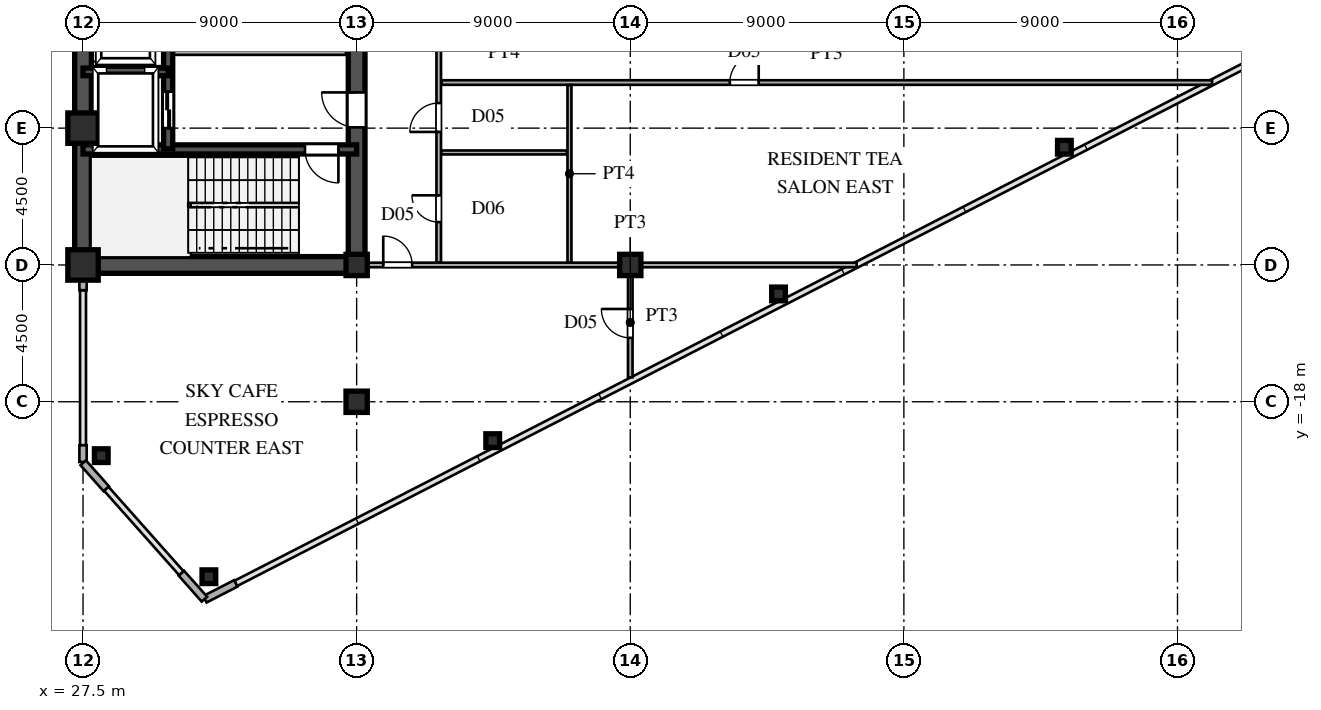
"""IFC4 building model, lengths in metres.
Left out: names, types, materials, properties, quantities, classifications, styles, units other than length and angle.
Written with IfcOpenShell. Run it as: python <this file> out.ifc"""

import sys

from ifc_helpers import new_model, si_unit, direction, frame, frame_2d, origin, origin_2d, place, context, subcontext, project, spatial, rectangle, hollow_rectangle, i_section, extrude, source, transform, mapped, element, fill, save


model = new_model("IFC4")
c1 = context("Model", 3, precision=1e-05, world=origin(), true_north=direction((0.0, 1.0)))
c2 = subcontext(c1, "Body", "Model", "MODEL_VIEW")
j1 = project(units=[si_unit("LENGTHUNIT", "METRE"), si_unit("PLANEANGLEUNIT", "RADIAN")], contexts=[c1])
p1 = place(None, origin())
s1 = spatial("IfcSite", under=j1, at=p1, CompositionType="ELEMENT")
p2 = place(p1, origin())
s2 = spatial("IfcBuilding", under=s1, at=p2, CompositionType="ELEMENT")
p3 = place(p2, frame((0.0, 0.0, 135.6)))
s3 = spatial("IfcBuildingStorey", under=s2, at=p3, CompositionType="ELEMENT", Elevation=135.6)
m1 = source(origin(), c2, "Body", "SweptSolid", [
    extrude(hollow_rectangle(XDim=1.0, YDim=1.0, WallThickness=0.042, at=origin_2d()), origin(), (0.0, 0.0, 1.0), 4.8),
])
for number, where, z_axis, x_axis in (
    (1, (27.5, -13.5, 0.0), (0.0, 0.0, 1.0), (1.0, 0.0, 0.0)),
    (2, (27.5, -9.0, 0.0), (0.0, 0.0, 1.0), (1.0, 0.0, 0.0)),
):
    element("IfcColumn", number, at=place(p3, frame(where, z_axis=z_axis, x_axis=x_axis)), inside=s3, PredefinedType="COLUMN", context=c2, shape_type="MappedRepresentation", body=[
        mapped(m1, transform((0.0, 0.0, 0.0), scale=1.0)),
    ])
m2 = source(origin(), c2, "Body", "SweptSolid", [
    extrude(i_section(OverallWidth=0.7, OverallDepth=0.7, WebThickness=0.028, FlangeThickness=0.045, at=origin_2d()), origin(), (0.0, 0.0, 1.0), 4.8),
])
for number, where, z_axis, x_axis in (
    (3, (36.5, -18.0, 0.0), (0.0, 0.0, 1.0), (1.0, 0.0, 0.0)),
    (4, (36.5, -13.5, 0.0), (0.0, 0.0, 1.0), (1.0, 0.0, 0.0)),
    (5, (45.5, -13.5, 0.0), (0.0, 0.0, 1.0), (1.0, 0.0, 0.0)),
):
    element("IfcColumn", number, at=place(p3, frame(where, z_axis=z_axis, x_axis=x_axis)), inside=s3, PredefinedType="COLUMN", context=c2, shape_type="MappedRepresentation", body=[
        mapped(m2, transform((0.0, 0.0, 0.0), scale=1.0)),
    ])
m3 = source(origin(), c2, "Body", "SweptSolid", [
    extrude(hollow_rectangle(XDim=0.45, YDim=0.45, WallThickness=0.018, at=origin_2d()), origin(), (0.0, 0.0, 1.0), 4.8),
])
for number, where, z_axis, x_axis in (
    (6, (31.64, -23.754, 0.0), (0.0, 0.0, 1.0), (1.0, 0.0, 0.0)),
    (7, (28.1, -19.772, 0.0), (0.0, 0.0, 1.0), (1.0, 0.0, 0.0)),
    (8, (40.976, -19.278, 0.0), (0.0, 0.0, 1.0), (1.0, 0.0, 0.0)),
    (9, (50.377, -14.453, 0.0), (0.0, 0.0, 1.0), (1.0, 0.0, 0.0)),
    (10, (59.779, -9.629, 0.0), (0.0, 0.0, 1.0), (1.0, 0.0, 0.0)),
):
    element("IfcColumn", number, at=place(p3, frame(where, z_axis=z_axis, x_axis=x_axis)), inside=s3, PredefinedType="COLUMN", context=c2, shape_type="MappedRepresentation", body=[
        mapped(m3, transform((0.0, 0.0, 0.0), scale=1.0)),
    ])
p4 = place(p3, frame((31.509, -24.495, 0.0), z_axis=(0.0, 0.0, 1.0), x_axis=(0.889797395748, 0.456355776255, 0.0)))
e11 = element("IfcWall", 11, at=p4, inside=s3, PredefinedType="SOLIDWALL", context=c2, shape_type="SweptSolid", body=[
    extrude(rectangle(XDim=1.14, YDim=0.24, at=frame_2d((0.57, 0.0))), origin(), (0.0, 0.0, 1.0), 4.58),
])
p5 = place(p3, frame((27.5, -19.98, 0.0), z_axis=(0.0, 0.0, 1.0), x_axis=(0.0, 1.0, 0.0)))
e12 = element("IfcWall", 12, at=p5, inside=s3, PredefinedType="SOLIDWALL", context=c2, shape_type="SweptSolid", body=[
    extrude(rectangle(XDim=0.55, YDim=0.24, at=frame_2d((0.275, 0.0))), origin(), (0.0, 0.0, 1.0), 4.58),
])
p6 = place(p3, frame((27.5, -14.33, 0.0), z_axis=(0.0, 0.0, 1.0), x_axis=(0.0, 1.0, 0.0)))
e13 = element("IfcWall", 13, at=p6, inside=s3, PredefinedType="SOLIDWALL", context=c2, shape_type="SweptSolid", body=[
    extrude(rectangle(XDim=0.55, YDim=0.24, at=frame_2d((0.275, 0.0))), origin(), (0.0, 0.0, 1.0), 4.08),
])
for number, where, z_axis, x_axis in (
    (14, (27.507, -20.008, 0.0), (0.0, 0.0, 1.0), (0.664, -0.747, 0.0)),
    (15, (30.736, -23.64, 0.0), (0.0, 0.0, 1.0), (0.664, -0.747, 0.0)),
):
    element("IfcWall", number, at=place(p3, frame(where, z_axis=z_axis, x_axis=x_axis)), inside=s3, PredefinedType="SOLIDWALL", context=c2, shape_type="SweptSolid", body=[
        extrude(rectangle(XDim=1.14, YDim=0.24, at=frame_2d((0.57, 0.0))), origin(), (0.0, 0.0, 1.0), 4.58),
    ])
p7 = place(p3, frame((27.5, -13.5, 0.0), z_axis=(0.0, 0.0, 1.0), x_axis=(0.0, 1.0, 0.0)))
e16 = element("IfcWall", 16, at=p7, inside=s3, PredefinedType="SHEAR", context=c2, shape_type="SweptSolid", body=[
    extrude(rectangle(XDim=12.2, YDim=0.55, at=frame_2d((6.1, 0.0))), origin(), (0.0, 0.0, 1.0), 4.58),
])
p8 = place(p3, frame((27.5, -13.5, 0.0), z_axis=(0.0, 0.0, 1.0), x_axis=(1.0, 0.0, 0.0)))
e17 = element("IfcWall", 17, at=p8, inside=s3, PredefinedType="SHEAR", context=c2, shape_type="SweptSolid", body=[
    extrude(rectangle(XDim=9.0, YDim=0.55, at=frame_2d((4.5, 0.0))), origin(), (0.0, 0.0, 1.0), 4.58),
])
p9 = place(p3, frame((36.5, -13.65, 0.0), z_axis=(0.0, 0.0, 1.0), x_axis=(0.0, 1.0, 0.0)))
e18 = element("IfcWall", 18, at=p9, inside=s3, PredefinedType="SHEAR", context=c2, shape_type="SweptSolid", body=[
    extrude(rectangle(XDim=7.15, YDim=0.55, at=frame_2d((3.575, 0.0))), origin(), (0.0, 0.0, 1.0), 4.58),
])
p10 = place(p9, frame((4.675, 0.0, 0.0)))
e19 = element("IfcOpeningElement", 19, at=p10, cuts=e18, PredefinedType="OPENING", context=c2, shape_type="SweptSolid", body=[
    extrude(rectangle(XDim=1.15, YDim=2.2, at=frame_2d((0.575, 1.1))), frame((0.0, 0.285, 0.0), z_axis=(0.0, -1.0, 0.0), x_axis=(1.0, 0.0, 0.0)), (0.0, 0.0, 1.0), 0.57),
])
p11 = place(p3, frame((27.5, -9.7, 0.0), z_axis=(0.0, 0.0, 1.0), x_axis=(1.0, 0.0, 0.0)))
e20 = element("IfcWall", 20, at=p11, inside=s3, PredefinedType="SHEAR", context=c2, shape_type="SweptSolid", body=[
    extrude(rectangle(XDim=9.0, YDim=0.3, at=frame_2d((4.5, 0.0))), origin(), (0.0, 0.0, 1.0), 4.58),
])
p12 = place(p11, frame((7.3, 0.0, 0.0)))
e21 = element("IfcOpeningElement", 21, at=p12, cuts=e20, PredefinedType="OPENING", context=c2, shape_type="SweptSolid", body=[
    extrude(rectangle(XDim=1.1, YDim=2.2, at=frame_2d((0.55, 1.1))), frame((0.0, 0.16, 0.0), z_axis=(0.0, -1.0, 0.0), x_axis=(1.0, 0.0, 0.0)), (0.0, 0.0, 1.0), 0.32),
])
p13 = place(p3, frame((27.5, -7.15, 0.0), z_axis=(0.0, 0.0, 1.0), x_axis=(1.0, 0.0, 0.0)))
e22 = element("IfcWall", 22, at=p13, inside=s3, PredefinedType="SHEAR", context=c2, shape_type="SweptSolid", body=[
    extrude(rectangle(XDim=2.8, YDim=0.25, at=frame_2d((1.4, 0.0))), origin(), (0.0, 0.0, 1.0), 4.58),
])
p14 = place(p3, frame((30.3, -9.68, 0.0), z_axis=(0.0, 0.0, 1.0), x_axis=(0.0, 1.0, 0.0)))
e23 = element("IfcWall", 23, at=p14, inside=s3, PredefinedType="SHEAR", context=c2, shape_type="SweptSolid", body=[
    extrude(rectangle(XDim=2.56, YDim=0.3, at=frame_2d((1.28, 0.0))), origin(), (0.0, 0.0, 1.0), 4.58),
])
p15 = place(p14, frame((0.68, 0.0, 0.0)))
e24 = element("IfcOpeningElement", 24, at=p15, cuts=e23, PredefinedType="OPENING", context=c2, shape_type="SweptSolid", body=[
    extrude(rectangle(XDim=1.2, YDim=2.25, at=frame_2d((0.6, 1.125))), frame((0.0, 0.16, 0.0), z_axis=(0.0, -1.0, 0.0), x_axis=(1.0, 0.0, 0.0)), (0.0, 0.0, 1.0), 0.32),
])
p16 = place(p3, frame((30.3, -7.12, 0.0), z_axis=(0.0, 0.0, 1.0), x_axis=(0.0, 1.0, 0.0)))
e25 = element("IfcWall", 25, at=p16, inside=s3, PredefinedType="SHEAR", context=c2, shape_type="SweptSolid", body=[
    extrude(rectangle(XDim=2.92, YDim=0.3, at=frame_2d((1.46, 0.0))), origin(), (0.0, 0.0, 1.0), 4.58),
])
p17 = place(p16, frame((0.91, 0.0, 0.0)))
e26 = element("IfcOpeningElement", 26, at=p17, cuts=e25, PredefinedType="OPENING", context=c2, shape_type="SweptSolid", body=[
    extrude(rectangle(XDim=1.1, YDim=2.2, at=frame_2d((0.55, 1.1))), frame((0.0, 0.16, 0.0), z_axis=(0.0, -1.0, 0.0), x_axis=(1.0, 0.0, 0.0)), (0.0, 0.0, 1.0), 0.32),
])
p18 = place(p3, frame((30.45, -6.5, 0.0), z_axis=(0.0, 0.0, 1.0), x_axis=(1.0, 0.0, 0.0)))
e27 = element("IfcWall", 27, at=p18, inside=s3, PredefinedType="PARTITIONING", context=c2, shape_type="SweptSolid", body=[
    extrude(rectangle(XDim=5.7, YDim=0.18, at=frame_2d((2.85, 0.0))), origin(), (0.0, 0.0, 1.0), 4.58),
])
p19 = place(p3, frame((36.78, -13.5, 0.0), z_axis=(0.0, 0.0, 1.0), x_axis=(1.0, 0.0, 0.0)))
e28 = element("IfcWall", 28, at=p19, inside=s3, PredefinedType="PARTITIONING", context=c2, shape_type="SweptSolid", body=[
    extrude(rectangle(XDim=16.167, YDim=0.15, at=frame_2d((8.083, 0.0))), origin(), (0.0, 0.0, 1.0), 3.98),
])
p20 = place(p19, frame((0.595, 0.0, 0.0)))
e29 = element("IfcOpeningElement", 29, at=p20, cuts=e28, PredefinedType="OPENING", context=c2, shape_type="SweptSolid", body=[
    extrude(rectangle(XDim=0.95, YDim=2.15, at=frame_2d((0.475, 1.075))), frame((0.0, 0.085, 0.0), z_axis=(0.0, -1.0, 0.0), x_axis=(1.0, 0.0, 0.0)), (0.0, 0.0, 1.0), 0.17),
])
p21 = place(p3, frame((39.285, -9.8, 0.0), z_axis=(0.0, 0.0, 1.0), x_axis=(1.0, 0.0, 0.0)))
e30 = element("IfcWall", 30, at=p21, inside=s3, PredefinedType="PARTITIONING", context=c2, shape_type="SweptSolid", body=[
    extrude(rectangle(XDim=4.13, YDim=0.13, at=frame_2d((2.065, 0.0))), origin(), (0.0, 0.0, 1.0), 4.58),
])
p22 = place(p3, frame((39.285, -7.5, 0.0), z_axis=(0.0, 0.0, 1.0), x_axis=(1.0, 0.0, 0.0)))
e31 = element("IfcWall", 31, at=p22, inside=s3, PredefinedType="PARTITIONING", context=c2, shape_type="SweptSolid", body=[
    extrude(rectangle(XDim=25.354, YDim=0.15, at=frame_2d((12.677, 0.0))), origin(), (0.0, 0.0, 1.0), 4.58),
])
p23 = place(p22, frame((9.49, 0.0, 0.0)))
e32 = element("IfcOpeningElement", 32, at=p23, cuts=e31, PredefinedType="OPENING", context=c2, shape_type="SweptSolid", body=[
    extrude(rectangle(XDim=0.95, YDim=2.15, at=frame_2d((0.475, 1.075))), frame((0.0, 0.085, 0.0), z_axis=(0.0, -1.0, 0.0), x_axis=(1.0, 0.0, 0.0)), (0.0, 0.0, 1.0), 0.17),
])
p24 = place(p3, frame((39.2, -13.415, 0.0), z_axis=(0.0, 0.0, 1.0), x_axis=(0.0, 1.0, 0.0)))
e33 = element("IfcWall", 33, at=p24, inside=s3, PredefinedType="PARTITIONING", context=c2, shape_type="SweptSolid", body=[
    extrude(rectangle(XDim=26.83, YDim=0.15, at=frame_2d((13.415, 0.0))), origin(), (0.0, 0.0, 1.0), 4.58),
])
p25 = place(p24, frame((12.94, 0.0, 0.0)))
e34 = element("IfcOpeningElement", 34, at=p25, cuts=e33, PredefinedType="OPENING", context=c2, shape_type="SweptSolid", body=[
    extrude(rectangle(XDim=0.95, YDim=2.15, at=frame_2d((0.475, 1.075))), frame((0.0, 0.085, 0.0), z_axis=(0.0, -1.0, 0.0), x_axis=(1.0, 0.0, 0.0)), (0.0, 0.0, 1.0), 0.17),
])
p26 = place(p24, frame((1.325, 0.0, 0.0)))
e35 = element("IfcOpeningElement", 35, at=p26, cuts=e33, PredefinedType="OPENING", context=c2, shape_type="SweptSolid", body=[
    extrude(rectangle(XDim=0.88, YDim=2.1, at=frame_2d((0.44, 1.05))), frame((0.0, 0.085, 0.0), z_axis=(0.0, -1.0, 0.0), x_axis=(1.0, 0.0, 0.0)), (0.0, 0.0, 1.0), 0.17),
])
p27 = place(p24, frame((4.29, 0.0, 0.0)))
e36 = element("IfcOpeningElement", 36, at=p27, cuts=e33, PredefinedType="OPENING", context=c2, shape_type="SweptSolid", body=[
    extrude(rectangle(XDim=0.95, YDim=2.15, at=frame_2d((0.475, 1.075))), frame((0.0, 0.085, 0.0), z_axis=(0.0, -1.0, 0.0), x_axis=(1.0, 0.0, 0.0)), (0.0, 0.0, 1.0), 0.17),
])
p28 = place(p24, frame((21.59, 0.0, 0.0)))
e37 = element("IfcOpeningElement", 37, at=p28, cuts=e33, PredefinedType="OPENING", context=c2, shape_type="SweptSolid", body=[
    extrude(rectangle(XDim=0.95, YDim=2.15, at=frame_2d((0.475, 1.075))), frame((0.0, 0.085, 0.0), z_axis=(0.0, -1.0, 0.0), x_axis=(1.0, 0.0, 0.0)), (0.0, 0.0, 1.0), 0.17),
])
p29 = place(p24, frame((24.625, 0.0, 0.0)))
e38 = element("IfcOpeningElement", 38, at=p29, cuts=e33, PredefinedType="OPENING", context=c2, shape_type="SweptSolid", body=[
    extrude(rectangle(XDim=0.88, YDim=2.1, at=frame_2d((0.44, 1.05))), frame((0.0, 0.085, 0.0), z_axis=(0.0, -1.0, 0.0), x_axis=(1.0, 0.0, 0.0)), (0.0, 0.0, 1.0), 0.17),
])
p30 = place(p3, frame((43.5, -13.415, 0.0), z_axis=(0.0, 0.0, 1.0), x_axis=(0.0, 1.0, 0.0)))
e39 = element("IfcWall", 39, at=p30, inside=s3, PredefinedType="PARTITIONING", context=c2, shape_type="SweptSolid", body=[
    extrude(rectangle(XDim=5.83, YDim=0.13, at=frame_2d((2.915, 0.0))), origin(), (0.0, 0.0, 1.0), 4.58),
])
p31 = place(p3, frame((45.5, -17.196, 0.0), z_axis=(0.0, 0.0, 1.0), x_axis=(0.0, 1.0, 0.0)))
e40 = element("IfcWall", 40, at=p31, inside=s3, PredefinedType="PARTITIONING", context=c2, shape_type="SweptSolid", body=[
    extrude(rectangle(XDim=3.611, YDim=0.15, at=frame_2d((1.806, 0.0))), origin(), (0.0, 0.0, 1.0), 4.58),
])
p32 = place(p31, frame((1.298, 0.0, 0.0)))
e41 = element("IfcOpeningElement", 41, at=p32, cuts=e40, PredefinedType="OPENING", context=c2, shape_type="SweptSolid", body=[
    extrude(rectangle(XDim=0.95, YDim=2.15, at=frame_2d((0.475, 1.075))), frame((0.0, 0.085, 0.0), z_axis=(0.0, -1.0, 0.0), x_axis=(1.0, 0.0, 0.0)), (0.0, 0.0, 1.0), 0.17),
])
m4 = source(origin(), c2, "Body", "SweptSolid", [
    extrude(rectangle(XDim=1.15, YDim=2.2, at=frame_2d((0.575, 1.1))), frame((0.0, 0.025, 0.0), z_axis=(0.0, -1.0, 0.0), x_axis=(1.0, 0.0, 0.0)), (0.0, 0.0, 1.0), 0.05),
])
p33 = place(p10, origin())
e42 = element("IfcDoor", 42, at=p33, inside=s3, OperationType="SINGLE_SWING_RIGHT", PredefinedType="DOOR", context=c2, shape_type="MappedRepresentation", body=[
    mapped(m4, transform((0.0, 0.0, 0.0), scale=1.0)),
])
fill(e19, e42)
m5 = source(origin(), c2, "Body", "SweptSolid", [
    extrude(rectangle(XDim=1.1, YDim=2.2, at=frame_2d((0.55, 1.1))), frame((0.0, 0.025, 0.0), z_axis=(0.0, -1.0, 0.0), x_axis=(1.0, 0.0, 0.0)), (0.0, 0.0, 1.0), 0.05),
])
p34 = place(p12, frame((1.1, 0.0, 0.0), z_axis=(0.0, 0.0, 1.0), x_axis=(-1.0, 0.0, 0.0)))
e43 = element("IfcDoor", 43, at=p34, inside=s3, OperationType="SINGLE_SWING_RIGHT", PredefinedType="DOOR", context=c2, shape_type="MappedRepresentation", body=[
    mapped(m5, transform((0.0, 0.0, 0.0), scale=1.0)),
])
fill(e21, e43)
m6 = source(origin(), c2, "Body", "SweptSolid", [
    extrude(rectangle(XDim=1.2, YDim=2.25, at=frame_2d((0.6, 1.125))), frame((0.0, 0.025, 0.0), z_axis=(0.0, -1.0, 0.0), x_axis=(1.0, 0.0, 0.0)), (0.0, 0.0, 1.0), 0.05),
])
p35 = place(p15, origin())
e44 = element("IfcDoor", 44, at=p35, inside=s3, OperationType="DOUBLE_DOOR_SLIDING", PredefinedType="DOOR", context=c2, shape_type="MappedRepresentation", body=[
    mapped(m6, transform((0.0, 0.0, 0.0), scale=1.0)),
])
fill(e24, e44)
m7 = source(origin(), c2, "Body", "SweptSolid", [
    extrude(rectangle(XDim=0.95, YDim=2.15, at=frame_2d((0.475, 1.075))), frame((0.0, 0.025, 0.0), z_axis=(0.0, -1.0, 0.0), x_axis=(1.0, 0.0, 0.0)), (0.0, 0.0, 1.0), 0.05),
])
p36 = place(p20, origin())
e45 = element("IfcDoor", 45, at=p36, inside=s3, OperationType="SINGLE_SWING_LEFT", PredefinedType="DOOR", context=c2, shape_type="MappedRepresentation", body=[
    mapped(m7, transform((0.0, 0.0, 0.0), scale=1.0)),
])
fill(e29, e45)
p37 = place(p23, origin())
e46 = element("IfcDoor", 46, at=p37, inside=s3, OperationType="SINGLE_SWING_RIGHT", PredefinedType="DOOR", context=c2, shape_type="MappedRepresentation", body=[
    mapped(m7, transform((0.0, 0.0, 0.0), scale=1.0)),
])
fill(e32, e46)
m8 = source(origin(), c2, "Body", "SweptSolid", [
    extrude(rectangle(XDim=0.88, YDim=2.1, at=frame_2d((0.44, 1.05))), frame((0.0, 0.025, 0.0), z_axis=(0.0, -1.0, 0.0), x_axis=(1.0, 0.0, 0.0)), (0.0, 0.0, 1.0), 0.05),
])
p38 = place(p26, origin())
e47 = element("IfcDoor", 47, at=p38, inside=s3, OperationType="SINGLE_SWING_RIGHT", PredefinedType="DOOR", context=c2, shape_type="MappedRepresentation", body=[
    mapped(m8, transform((0.0, 0.0, 0.0), scale=1.0)),
])
fill(e35, e47)
p39 = place(p27, origin())
e48 = element("IfcDoor", 48, at=p39, inside=s3, OperationType="SINGLE_SWING_LEFT", PredefinedType="DOOR", context=c2, shape_type="MappedRepresentation", body=[
    mapped(m7, transform((0.0, 0.0, 0.0), scale=1.0)),
])
fill(e36, e48)
p40 = place(p32, origin())
e49 = element("IfcDoor", 49, at=p40, inside=s3, OperationType="SINGLE_SWING_RIGHT", PredefinedType="DOOR", context=c2, shape_type="MappedRepresentation", body=[
    mapped(m7, transform((0.0, 0.0, 0.0), scale=1.0)),
])
fill(e41, e49)
save(model, sys.argv[1])
